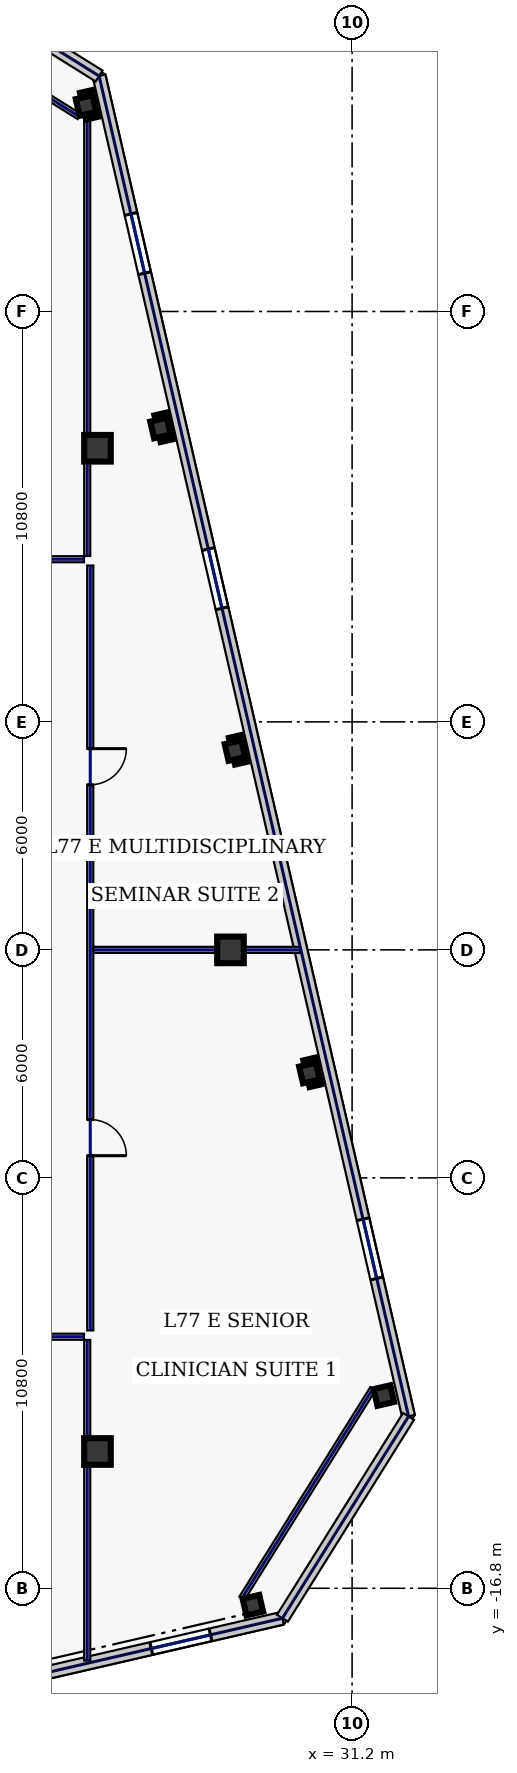
"""IFC4 building model, lengths in metres.
Left out: names, types, materials, properties, quantities, classifications, styles, units other than length and angle.
Written with IfcOpenShell. Run it as: python <this file> out.ifc"""

import sys

from ifc_helpers import new_model, si_unit, direction, frame, frame_2d, origin, origin_2d, place, context, subcontext, project, spatial, rectangle, hollow_rectangle, extrude, element, fill, save


model = new_model("IFC4")
c1 = context("Model", 3, precision=1e-05, world=origin(), true_north=direction((0.0, 1.0)))
c2 = subcontext(c1, "Body", "Model", "MODEL_VIEW")
j1 = project(units=[si_unit("LENGTHUNIT", "METRE"), si_unit("PLANEANGLEUNIT", "RADIAN")], contexts=[c1])
p1 = place(None, origin())
s1 = spatial("IfcSite", under=j1, at=p1, CompositionType="ELEMENT")
p2 = place(p1, origin())
s2 = spatial("IfcBuilding", under=s1, at=p2, CompositionType="ELEMENT")
p3 = place(p2, frame((0.0, 0.0, 329.0)))
s3 = spatial("IfcBuildingStorey", under=s2, at=p3, CompositionType="ELEMENT", Elevation=329.0)
for number, where, z_axis, x_axis in (
    (1, (24.5, -13.2, 0.0), (0.0, 0.0, 1.0), (1.0, 0.0, 0.0)),
    (2, (24.5, 13.2, 0.0), (0.0, 0.0, 1.0), (1.0, 0.0, 0.0)),
    (3, (28.0, 0.0, 0.0), (0.0, 0.0, 1.0), (1.0, 0.0, 0.0)),
):
    element("IfcColumn", number, at=place(p3, frame(where, z_axis=z_axis, x_axis=x_axis)), inside=s3, PredefinedType="COLUMN", context=c2, shape_type="SweptSolid", body=[
        extrude(hollow_rectangle(XDim=0.7, YDim=0.7, WallThickness=0.032, at=origin_2d()), origin(), (0.0, 0.0, 1.0), 3.68),
    ])
for number, where, z_axis, x_axis in (
    (4, (28.589, -17.245, 0.0), (0.0, 0.0, 1.0), (0.974, 0.225, 0.0)),
    (5, (32.036, -11.728, 0.0), (0.0, 0.0, 1.0), (0.974, 0.225, 0.0)),
    (6, (30.077, -3.241, 0.0), (0.0, 0.0, 1.0), (0.974, 0.225, 0.0)),
    (7, (28.117, 5.246, 0.0), (0.0, 0.0, 1.0), (0.974, 0.225, 0.0)),
    (8, (26.158, 13.732, 0.0), (0.0, 0.0, 1.0), (0.974, 0.225, 0.0)),
    (9, (24.198, 22.219, 0.0), (0.0, 0.0, 1.0), (0.974, 0.225, 0.0)),
):
    element("IfcColumn", number, at=place(p3, frame(where, z_axis=z_axis, x_axis=x_axis)), inside=s3, PredefinedType="COLUMN", context=c2, shape_type="SweptSolid", body=[
        extrude(hollow_rectangle(XDim=0.45, YDim=0.45, WallThickness=0.022, at=origin_2d()), origin(), (0.0, 0.0, 1.0), 3.68),
    ])
p4 = place(p3, frame((12.445, -21.495, 0.0), z_axis=(0.0, 0.0, 1.0), x_axis=(0.974369392164, 0.224953967767, 0.0)))
e10 = element("IfcWall", 10, at=p4, inside=s3, PredefinedType="STANDARD", context=c2, shape_type="SweptSolid", body=[
    extrude(rectangle(XDim=17.366, YDim=0.34, at=frame_2d((8.683, 0.0))), origin(), (0.0, 0.0, 1.0), 3.68),
])
p5 = place(p4, frame((2.678, 0.0, 0.22)))
e11 = element("IfcOpeningElement", 11, at=p5, cuts=e10, PredefinedType="OPENING", context=c2, shape_type="SweptSolid", body=[
    extrude(rectangle(XDim=1.6, YDim=1.2, at=frame_2d((0.8, 0.6))), frame((0.0, 0.18, 0.0), z_axis=(0.0, -1.0, 0.0), x_axis=(1.0, 0.0, 0.0)), (0.0, 0.0, 1.0), 0.36),
])
p6 = place(p4, frame((6.19, 0.0, 0.22)))
e12 = element("IfcOpeningElement", 12, at=p6, cuts=e10, PredefinedType="OPENING", context=c2, shape_type="SweptSolid", body=[
    extrude(rectangle(XDim=1.6, YDim=1.2, at=frame_2d((0.8, 0.6))), frame((0.0, 0.18, 0.0), z_axis=(0.0, -1.0, 0.0), x_axis=(1.0, 0.0, 0.0)), (0.0, 0.0, 1.0), 0.36),
])
p7 = place(p4, frame((13.825, 0.0, 0.22)))
e13 = element("IfcOpeningElement", 13, at=p7, cuts=e10, PredefinedType="OPENING", context=c2, shape_type="SweptSolid", body=[
    extrude(rectangle(XDim=1.6, YDim=1.2, at=frame_2d((0.8, 0.6))), frame((0.0, 0.18, 0.0), z_axis=(0.0, -1.0, 0.0), x_axis=(1.0, 0.0, 0.0)), (0.0, 0.0, 1.0), 0.36),
])
p8 = place(p3, frame((32.686, -12.276, 0.0), z_axis=(0.0, 0.0, 1.0), x_axis=(-0.224953091034, 0.974369594576, 0.0)))
e14 = element("IfcWall", 14, at=p8, inside=s3, PredefinedType="STANDARD", context=c2, shape_type="SweptSolid", body=[
    extrude(rectangle(XDim=36.2, YDim=0.34, at=frame_2d((18.1, 0.0))), origin(), (0.0, 0.0, 1.0), 3.68),
])
p9 = place(p8, frame((3.725, 0.0, 0.22)))
e15 = element("IfcOpeningElement", 15, at=p9, cuts=e14, PredefinedType="OPENING", context=c2, shape_type="SweptSolid", body=[
    extrude(rectangle(XDim=1.6, YDim=1.2, at=frame_2d((0.8, 0.6))), frame((0.0, 0.18, 0.0), z_axis=(0.0, -1.0, 0.0), x_axis=(1.0, 0.0, 0.0)), (0.0, 0.0, 1.0), 0.36),
])
p10 = place(p8, frame((21.825, 0.0, 0.22)))
e16 = element("IfcOpeningElement", 16, at=p10, cuts=e14, PredefinedType="OPENING", context=c2, shape_type="SweptSolid", body=[
    extrude(rectangle(XDim=1.6, YDim=1.2, at=frame_2d((0.8, 0.6))), frame((0.0, 0.18, 0.0), z_axis=(0.0, -1.0, 0.0), x_axis=(1.0, 0.0, 0.0)), (0.0, 0.0, 1.0), 0.36),
])
p11 = place(p8, frame((30.875, 0.0, 0.22)))
e17 = element("IfcOpeningElement", 17, at=p11, cuts=e14, PredefinedType="OPENING", context=c2, shape_type="SweptSolid", body=[
    extrude(rectangle(XDim=1.6, YDim=1.2, at=frame_2d((0.8, 0.6))), frame((0.0, 0.18, 0.0), z_axis=(0.0, -1.0, 0.0), x_axis=(1.0, 0.0, 0.0)), (0.0, 0.0, 1.0), 0.36),
])
for number, where, z_axis, x_axis in (
    (18, (29.366, -17.589, 0.0), (0.0, 0.0, 1.0), (0.53, 0.848, 0.0)),
    (19, (24.542, 22.996, 0.0), (0.0, 0.0, 1.0), (-0.848, 0.53, 0.0)),
):
    element("IfcWall", number, at=place(p3, frame(where, z_axis=z_axis, x_axis=x_axis)), inside=s3, PredefinedType="STANDARD", context=c2, shape_type="SweptSolid", body=[
        extrude(rectangle(XDim=6.265, YDim=0.34, at=frame_2d((3.132, 0.0))), origin(), (0.0, 0.0, 1.0), 3.68),
    ])
for number, where, z_axis, x_axis in (
    (20, (28.3, -17.065, 0.0), (0.0, 0.0, 1.0), (0.53, 0.848, 0.0)),
    (21, (24.018, 21.931, 0.0), (0.0, 0.0, 1.0), (-0.848, 0.53, 0.0)),
):
    element("IfcWall", number, at=place(p3, frame(where, z_axis=z_axis, x_axis=x_axis)), inside=s3, PredefinedType="PARTITIONING", context=c2, shape_type="SweptSolid", body=[
        extrude(rectangle(XDim=6.505, YDim=0.16, at=frame_2d((3.253, 0.0))), origin(), (0.0, 0.0, 1.0), 1.475),
    ])
p12 = place(p3, frame((-24.145, 10.28, 0.0), z_axis=(0.0, 0.0, 1.0), x_axis=(1.0, 0.0, 0.0)))
e22 = element("IfcWall", 22, at=p12, inside=s3, PredefinedType="PARTITIONING", context=c2, shape_type="SweptSolid", body=[
    extrude(rectangle(XDim=48.29, YDim=0.16, at=frame_2d((24.145, 0.0))), origin(), (0.0, 0.0, 1.0), 3.68),
])
p13 = place(p12, frame((2.044, 0.0, 0.0)))
e23 = element("IfcOpeningElement", 23, at=p13, cuts=e22, PredefinedType="OPENING", context=c2, shape_type="SweptSolid", body=[
    extrude(rectangle(XDim=0.95, YDim=2.2, at=frame_2d((0.475, 1.1))), frame((0.0, 0.09, 0.0), z_axis=(0.0, -1.0, 0.0), x_axis=(1.0, 0.0, 0.0)), (0.0, 0.0, 1.0), 0.18),
])
p14 = place(p12, frame((7.165, 0.0, 0.0)))
e24 = element("IfcOpeningElement", 24, at=p14, cuts=e22, PredefinedType="OPENING", context=c2, shape_type="SweptSolid", body=[
    extrude(rectangle(XDim=0.95, YDim=2.2, at=frame_2d((0.475, 1.1))), frame((0.0, 0.09, 0.0), z_axis=(0.0, -1.0, 0.0), x_axis=(1.0, 0.0, 0.0)), (0.0, 0.0, 1.0), 0.18),
])
p15 = place(p12, frame((14.755, 0.0, 0.0)))
e25 = element("IfcOpeningElement", 25, at=p15, cuts=e22, PredefinedType="OPENING", context=c2, shape_type="SweptSolid", body=[
    extrude(rectangle(XDim=1.05, YDim=2.2, at=frame_2d((0.525, 1.1))), frame((0.0, 0.09, 0.0), z_axis=(0.0, -1.0, 0.0), x_axis=(1.0, 0.0, 0.0)), (0.0, 0.0, 1.0), 0.18),
])
p16 = place(p12, frame((24.155, 0.0, 0.0)))
e26 = element("IfcOpeningElement", 26, at=p16, cuts=e22, PredefinedType="OPENING", context=c2, shape_type="SweptSolid", body=[
    extrude(rectangle(XDim=1.15, YDim=2.2, at=frame_2d((0.575, 1.1))), frame((0.0, 0.09, 0.0), z_axis=(0.0, -1.0, 0.0), x_axis=(1.0, 0.0, 0.0)), (0.0, 0.0, 1.0), 0.18),
])
p17 = place(p12, frame((33.435, 0.0, 0.0)))
e27 = element("IfcOpeningElement", 27, at=p17, cuts=e22, PredefinedType="OPENING", context=c2, shape_type="SweptSolid", body=[
    extrude(rectangle(XDim=0.95, YDim=2.2, at=frame_2d((0.475, 1.1))), frame((0.0, 0.09, 0.0), z_axis=(0.0, -1.0, 0.0), x_axis=(1.0, 0.0, 0.0)), (0.0, 0.0, 1.0), 0.18),
])
p18 = place(p12, frame((41.105, 0.0, 0.0)))
e28 = element("IfcOpeningElement", 28, at=p18, cuts=e22, PredefinedType="OPENING", context=c2, shape_type="SweptSolid", body=[
    extrude(rectangle(XDim=0.95, YDim=2.2, at=frame_2d((0.475, 1.1))), frame((0.0, 0.09, 0.0), z_axis=(0.0, -1.0, 0.0), x_axis=(1.0, 0.0, 0.0)), (0.0, 0.0, 1.0), 0.18),
])
p19 = place(p12, frame((45.346, 0.0, 0.0)))
e29 = element("IfcOpeningElement", 29, at=p19, cuts=e22, PredefinedType="OPENING", context=c2, shape_type="SweptSolid", body=[
    extrude(rectangle(XDim=0.95, YDim=2.2, at=frame_2d((0.475, 1.1))), frame((0.0, 0.09, 0.0), z_axis=(0.0, -1.0, 0.0), x_axis=(1.0, 0.0, 0.0)), (0.0, 0.0, 1.0), 0.18),
])
p20 = place(p3, frame((24.31, 10.115, 0.0), z_axis=(0.0, 0.0, 1.0), x_axis=(0.0, -1.0, 0.0)))
e30 = element("IfcWall", 30, at=p20, inside=s3, PredefinedType="PARTITIONING", context=c2, shape_type="SweptSolid", body=[
    extrude(rectangle(XDim=20.13, YDim=0.16, at=frame_2d((10.065, 0.0))), origin(), (0.0, 0.0, 1.0), 3.68),
])
p21 = place(p20, frame((14.581, 0.0, 0.0)))
e31 = element("IfcOpeningElement", 31, at=p21, cuts=e30, PredefinedType="OPENING", context=c2, shape_type="SweptSolid", body=[
    extrude(rectangle(XDim=0.95, YDim=2.2, at=frame_2d((0.475, 1.1))), frame((0.0, 0.09, 0.0), z_axis=(0.0, -1.0, 0.0), x_axis=(1.0, 0.0, 0.0)), (0.0, 0.0, 1.0), 0.18),
])
p22 = place(p20, frame((4.819, 0.0, 0.0)))
e32 = element("IfcOpeningElement", 32, at=p22, cuts=e30, PredefinedType="OPENING", context=c2, shape_type="SweptSolid", body=[
    extrude(rectangle(XDim=0.95, YDim=2.2, at=frame_2d((0.475, 1.1))), frame((0.0, 0.09, 0.0), z_axis=(0.0, -1.0, 0.0), x_axis=(1.0, 0.0, 0.0)), (0.0, 0.0, 1.0), 0.18),
])
p23 = place(p3, frame((24.145, -10.18, 0.0), z_axis=(0.0, 0.0, 1.0), x_axis=(-1.0, 0.0, 0.0)))
e33 = element("IfcWall", 33, at=p23, inside=s3, PredefinedType="PARTITIONING", context=c2, shape_type="SweptSolid", body=[
    extrude(rectangle(XDim=36.68, YDim=0.16, at=frame_2d((18.34, 0.0))), origin(), (0.0, 0.0, 1.0), 3.68),
])
p24 = place(p23, frame((32.996, 0.0, 0.0)))
e34 = element("IfcOpeningElement", 34, at=p24, cuts=e33, PredefinedType="OPENING", context=c2, shape_type="SweptSolid", body=[
    extrude(rectangle(XDim=0.95, YDim=2.2, at=frame_2d((0.475, 1.1))), frame((0.0, 0.09, 0.0), z_axis=(0.0, -1.0, 0.0), x_axis=(1.0, 0.0, 0.0)), (0.0, 0.0, 1.0), 0.18),
])
p25 = place(p23, frame((24.68, 0.0, 0.0)))
e35 = element("IfcOpeningElement", 35, at=p25, cuts=e33, PredefinedType="OPENING", context=c2, shape_type="SweptSolid", body=[
    extrude(rectangle(XDim=0.95, YDim=2.2, at=frame_2d((0.475, 1.1))), frame((0.0, 0.09, 0.0), z_axis=(0.0, -1.0, 0.0), x_axis=(1.0, 0.0, 0.0)), (0.0, 0.0, 1.0), 0.18),
])
p26 = place(p23, frame((16.68, 0.0, 0.0)))
e36 = element("IfcOpeningElement", 36, at=p26, cuts=e33, PredefinedType="OPENING", context=c2, shape_type="SweptSolid", body=[
    extrude(rectangle(XDim=1.15, YDim=2.2, at=frame_2d((0.575, 1.1))), frame((0.0, 0.09, 0.0), z_axis=(0.0, -1.0, 0.0), x_axis=(1.0, 0.0, 0.0)), (0.0, 0.0, 1.0), 0.18),
])
p27 = place(p23, frame((9.38, 0.0, 0.0)))
e37 = element("IfcOpeningElement", 37, at=p27, cuts=e33, PredefinedType="OPENING", context=c2, shape_type="SweptSolid", body=[
    extrude(rectangle(XDim=0.95, YDim=2.2, at=frame_2d((0.475, 1.1))), frame((0.0, 0.09, 0.0), z_axis=(0.0, -1.0, 0.0), x_axis=(1.0, 0.0, 0.0)), (0.0, 0.0, 1.0), 0.18),
])
p28 = place(p23, frame((2.934, 0.0, 0.0)))
e38 = element("IfcOpeningElement", 38, at=p28, cuts=e33, PredefinedType="OPENING", context=c2, shape_type="SweptSolid", body=[
    extrude(rectangle(XDim=1.05, YDim=2.2, at=frame_2d((0.525, 1.1))), frame((0.0, 0.09, 0.0), z_axis=(0.0, -1.0, 0.0), x_axis=(1.0, 0.0, 0.0)), (0.0, 0.0, 1.0), 0.18),
])
p29 = place(p3, frame((24.23, 10.365, 0.0), z_axis=(0.0, 0.0, 1.0), x_axis=(0.0, 1.0, 0.0)))
e39 = element("IfcWall", 39, at=p29, inside=s3, PredefinedType="PARTITIONING", context=c2, shape_type="SweptSolid", body=[
    extrude(rectangle(XDim=12.206, YDim=0.16, at=frame_2d((6.103, 0.0))), origin(), (0.0, 0.0, 1.0), 1.475),
])
p30 = place(p3, frame((24.23, -18.703, 0.0), z_axis=(0.0, 0.0, 1.0), x_axis=(0.0, 1.0, 0.0)))
e40 = element("IfcWall", 40, at=p30, inside=s3, PredefinedType="PARTITIONING", context=c2, shape_type="SweptSolid", body=[
    extrude(rectangle(XDim=8.438, YDim=0.16, at=frame_2d((4.219, 0.0))), origin(), (0.0, 0.0, 1.0), 2.075),
])
p31 = place(p3, frame((24.395, 0.0, 0.0), z_axis=(0.0, 0.0, 1.0), x_axis=(1.0, 0.0, 0.0)))
e41 = element("IfcWall", 41, at=p31, inside=s3, PredefinedType="PARTITIONING", context=c2, shape_type="SweptSolid", body=[
    extrude(rectangle(XDim=5.436, YDim=0.16, at=frame_2d((2.718, 0.0))), origin(), (0.0, 0.0, 1.0), 3.68),
])
p32 = place(p7, origin())
e42 = element("IfcWindow", 42, at=p32, inside=s3, PartitioningType="SINGLE_PANEL", PredefinedType="WINDOW", context=c2, shape_type="SweptSolid", body=[
    extrude(rectangle(XDim=1.6, YDim=1.2, at=frame_2d((0.8, 0.6))), frame((0.0, 0.03, 0.0), z_axis=(0.0, -1.0, 0.0), x_axis=(1.0, 0.0, 0.0)), (0.0, 0.0, 1.0), 0.06),
])
fill(e13, e42)
p33 = place(p9, origin())
e43 = element("IfcWindow", 43, at=p33, inside=s3, PartitioningType="SINGLE_PANEL", PredefinedType="WINDOW", context=c2, shape_type="SweptSolid", body=[
    extrude(rectangle(XDim=1.6, YDim=1.2, at=frame_2d((0.8, 0.6))), frame((0.0, 0.03, 0.0), z_axis=(0.0, -1.0, 0.0), x_axis=(1.0, 0.0, 0.0)), (0.0, 0.0, 1.0), 0.06),
])
fill(e15, e43)
p34 = place(p10, origin())
e44 = element("IfcWindow", 44, at=p34, inside=s3, PartitioningType="SINGLE_PANEL", PredefinedType="WINDOW", context=c2, shape_type="SweptSolid", body=[
    extrude(rectangle(XDim=1.6, YDim=1.2, at=frame_2d((0.8, 0.6))), frame((0.0, 0.03, 0.0), z_axis=(0.0, -1.0, 0.0), x_axis=(1.0, 0.0, 0.0)), (0.0, 0.0, 1.0), 0.06),
])
fill(e16, e44)
p35 = place(p11, origin())
e45 = element("IfcWindow", 45, at=p35, inside=s3, PartitioningType="SINGLE_PANEL", PredefinedType="WINDOW", context=c2, shape_type="SweptSolid", body=[
    extrude(rectangle(XDim=1.6, YDim=1.2, at=frame_2d((0.8, 0.6))), frame((0.0, 0.03, 0.0), z_axis=(0.0, -1.0, 0.0), x_axis=(1.0, 0.0, 0.0)), (0.0, 0.0, 1.0), 0.06),
])
fill(e17, e45)
p36 = place(p21, origin())
e46 = element("IfcDoor", 46, at=p36, inside=s3, OperationType="SINGLE_SWING_RIGHT", PredefinedType="DOOR", context=c2, shape_type="SweptSolid", body=[
    extrude(rectangle(XDim=0.95, YDim=2.2, at=frame_2d((0.475, 1.1))), frame((0.0, 0.025, 0.0), z_axis=(0.0, -1.0, 0.0), x_axis=(1.0, 0.0, 0.0)), (0.0, 0.0, 1.0), 0.05),
])
fill(e31, e46)
p37 = place(p22, origin())
e47 = element("IfcDoor", 47, at=p37, inside=s3, OperationType="SINGLE_SWING_LEFT", PredefinedType="DOOR", context=c2, shape_type="SweptSolid", body=[
    extrude(rectangle(XDim=0.95, YDim=2.2, at=frame_2d((0.475, 1.1))), frame((0.0, 0.025, 0.0), z_axis=(0.0, -1.0, 0.0), x_axis=(1.0, 0.0, 0.0)), (0.0, 0.0, 1.0), 0.05),
])
fill(e32, e47)
save(model, sys.argv[1])
